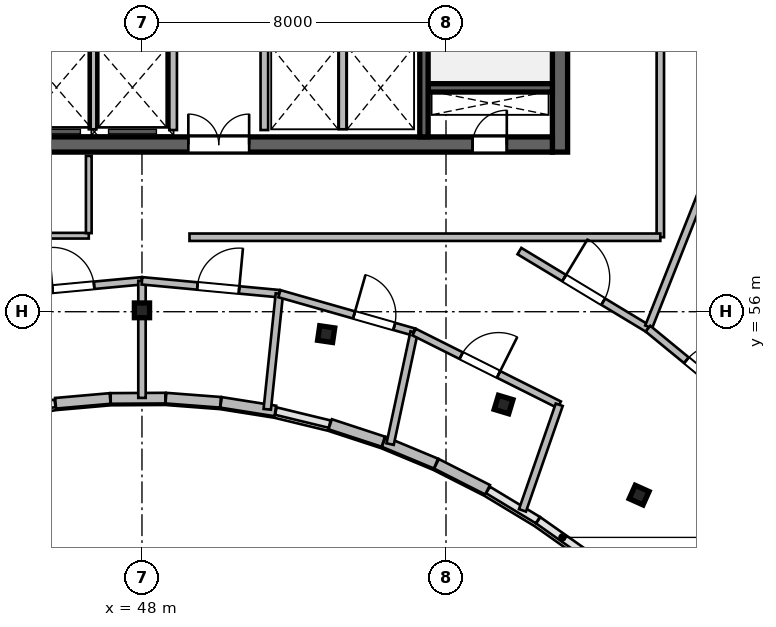
"""IFC4 building model, lengths in metres.
Left out: names, types, materials, properties, quantities, classifications, styles, units other than length and angle.
Written with IfcOpenShell. Run it as: python <this file> out.ifc"""

import sys

from ifc_helpers import new_model, si_unit, direction, frame, frame_2d, origin, origin_2d, place, context, subcontext, project, spatial, rectangle, i_section, extrude, source, transform, mapped, element, fill, save


model = new_model("IFC4")
c1 = context("Model", 3, precision=1e-05, world=origin(), true_north=direction((0.0, 1.0)))
c2 = subcontext(c1, "Body", "Model", "MODEL_VIEW")
j1 = project(units=[si_unit("LENGTHUNIT", "METRE"), si_unit("PLANEANGLEUNIT", "RADIAN")], contexts=[c1])
p1 = place(None, origin())
s1 = spatial("IfcSite", under=j1, at=p1, CompositionType="ELEMENT")
p2 = place(p1, origin())
s2 = spatial("IfcBuilding", under=s1, at=p2, CompositionType="ELEMENT")
p3 = place(p2, frame((0.0, 0.0, 283.5)))
s3 = spatial("IfcBuildingStorey", under=s2, at=p3, CompositionType="ELEMENT", Elevation=283.5)
m1 = source(origin(), c2, "Body", "SweptSolid", [
    extrude(rectangle(XDim=12.0, YDim=0.4, at=frame_2d((6.0, 0.0))), origin(), (0.0, 0.0, 1.0), 3.9),
])
p4 = place(p3, frame((59.0, 60.2, 0.0), z_axis=(0.0, 0.0, 1.0), x_axis=(0.0, 1.0, 0.0)))
e1 = element("IfcWall", 1, at=p4, inside=s3, PredefinedType="SHEAR", context=c2, shape_type="MappedRepresentation", body=[
    mapped(m1, transform((0.0, 0.0, 0.0), scale=1.0)),
])
m2 = source(origin(), c2, "Body", "SweptSolid", [
    extrude(rectangle(XDim=21.6, YDim=0.4, at=frame_2d((10.8, 0.0))), origin(), (0.0, 0.0, 1.0), 3.9),
])
p5 = place(p3, frame((37.2, 60.4, 0.0), z_axis=(0.0, 0.0, 1.0), x_axis=(1.0, 0.0, 0.0)))
e2 = element("IfcWall", 2, at=p5, inside=s3, PredefinedType="SHEAR", context=c2, shape_type="MappedRepresentation", body=[
    mapped(m2, transform((0.0, 0.0, 0.0), scale=1.0)),
])
p6 = place(p5, frame((1.1, 0.0, 0.0)))
e3 = element("IfcOpeningElement", 3, at=p6, cuts=e2, PredefinedType="OPENING", context=c2, shape_type="SweptSolid", body=[
    extrude(rectangle(XDim=1.15, YDim=2.15, at=frame_2d((0.575, 1.075))), frame((0.0, 0.21, 0.0), z_axis=(0.0, -1.0, 0.0), x_axis=(1.0, 0.0, 0.0)), (0.0, 0.0, 1.0), 0.42),
])
p7 = place(p5, frame((19.5, 0.0, 0.0)))
e4 = element("IfcOpeningElement", 4, at=p7, cuts=e2, PredefinedType="OPENING", context=c2, shape_type="SweptSolid", body=[
    extrude(rectangle(XDim=0.9, YDim=2.1, at=frame_2d((0.45, 1.05))), frame((0.0, 0.21, 0.0), z_axis=(0.0, -1.0, 0.0), x_axis=(1.0, 0.0, 0.0)), (0.0, 0.0, 1.0), 0.42),
])
p8 = place(p5, frame((12.02, 0.0, 0.0)))
e5 = element("IfcOpeningElement", 5, at=p8, cuts=e2, PredefinedType="OPENING", context=c2, shape_type="SweptSolid", body=[
    extrude(rectangle(XDim=1.6, YDim=2.15, at=frame_2d((0.8, 1.075))), frame((0.0, 0.21, 0.0), z_axis=(0.0, -1.0, 0.0), x_axis=(1.0, 0.0, 0.0)), (0.0, 0.0, 1.0), 0.42),
])
m3 = source(origin(), c2, "Body", "SweptSolid", [
    extrude(rectangle(XDim=3.27, YDim=0.22, at=frame_2d((1.635, 0.0))), origin(), (0.0, 0.0, 1.0), 3.9),
])
p9 = place(p3, frame((55.53, 61.89, 0.0), z_axis=(0.0, 0.0, 1.0), x_axis=(1.0, 0.0, 0.0)))
e6 = element("IfcWall", 6, at=p9, inside=s3, PredefinedType="SHEAR", context=c2, shape_type="MappedRepresentation", body=[
    mapped(m3, transform((0.0, 0.0, 0.0), scale=1.0)),
])
m4 = source(origin(), c2, "Body", "SweptSolid", [
    extrude(rectangle(XDim=11.2, YDim=0.22, at=frame_2d((5.6, 0.0))), origin(), (0.0, 0.0, 1.0), 3.9),
])
p10 = place(p3, frame((55.42, 60.6, 0.0), z_axis=(0.0, 0.0, 1.0), x_axis=(0.0, 1.0, 0.0)))
e7 = element("IfcWall", 7, at=p10, inside=s3, PredefinedType="SHEAR", context=c2, shape_type="MappedRepresentation", body=[
    mapped(m4, transform((0.0, 0.0, 0.0), scale=1.0)),
])
p11 = place(p10, frame((9.645, 0.0, 0.0)))
e8 = element("IfcOpeningElement", 8, at=p11, cuts=e7, PredefinedType="OPENING", context=c2, shape_type="SweptSolid", body=[
    extrude(rectangle(XDim=1.15, YDim=2.15, at=frame_2d((0.575, 1.075))), frame((0.0, 0.12, 0.0), z_axis=(0.0, -1.0, 0.0), x_axis=(1.0, 0.0, 0.0)), (0.0, 0.0, 1.0), 0.24),
])
m5 = source(origin(), c2, "Body", "SweptSolid", [
    extrude(i_section(OverallWidth=0.399, OverallDepth=0.387, WebThickness=0.021, FlangeThickness=0.033, at=origin_2d()), origin(), (0.0, 0.0, 1.0), 3.9),
])
for number, where, z_axis, x_axis in (
    (9, (48.0, 56.036, 0.0), (0.0, 0.0, 1.0), (0.0, 1.0, 0.0)),
    (10, (52.846, 55.411, 0.0), (0.0, 0.0, 1.0), (0.143, 0.99, 0.0)),
    (11, (57.515, 53.558, 0.0), (0.0, 0.0, 1.0), (0.289, 0.957, 0.0)),
    (12, (61.082, 51.175, 0.0), (0.0, 0.0, 1.0), (0.409, 0.912, 0.0)),
):
    element("IfcColumn", number, at=place(p3, frame(where, z_axis=z_axis, x_axis=x_axis)), inside=s3, PredefinedType="COLUMN", context=c2, shape_type="MappedRepresentation", body=[
        mapped(m5, transform((0.0, 0.0, 0.0), scale=1.0)),
    ])
m6 = source(origin(), c2, "Body", "SweptSolid", [
    extrude(rectangle(XDim=1.509, YDim=0.28, at=frame_2d((0.754, 0.0))), origin(), (0.0, 0.0, 1.0), 3.64),
])
p12 = place(p3, frame((57.094, 51.315, 0.0), z_axis=(0.0, 0.0, 1.0), x_axis=(-0.89169189228, 0.452642871635, 0.0)))
e13 = element("IfcWall", 13, at=p12, inside=s3, PredefinedType="SOLIDWALL", context=c2, shape_type="MappedRepresentation", body=[
    mapped(m6, transform((0.0, 0.0, 0.0), scale=1.0)),
])
m7 = source(origin(), c2, "Body", "SweptSolid", [
    extrude(rectangle(XDim=1.488, YDim=0.28, at=frame_2d((0.744, 0.0))), origin(), (0.0, 0.0, 1.0), 3.64),
])
p13 = place(p3, frame((55.736, 52.004, 0.0), z_axis=(0.0, 0.0, 1.0), x_axis=(-0.923261314935, 0.384172545017, 0.0)))
e14 = element("IfcWall", 14, at=p13, inside=s3, PredefinedType="SOLIDWALL", context=c2, shape_type="MappedRepresentation", body=[
    mapped(m7, transform((0.0, 0.0, 0.0), scale=1.0)),
])
m8 = source(origin(), c2, "Body", "SweptSolid", [
    extrude(rectangle(XDim=1.47, YDim=0.28, at=frame_2d((0.735, 0.0))), origin(), (0.0, 0.0, 1.0), 3.64),
])
p14 = place(p3, frame((54.35, 52.58, 0.0), z_axis=(0.0, 0.0, 1.0), x_axis=(-0.950248878954, 0.311491682145, 0.0)))
e15 = element("IfcWall", 15, at=p14, inside=s3, PredefinedType="SOLIDWALL", context=c2, shape_type="MappedRepresentation", body=[
    mapped(m8, transform((0.0, 0.0, 0.0), scale=1.0)),
])
m9 = source(origin(), c2, "Body", "SweptSolid", [
    extrude(rectangle(XDim=1.446, YDim=0.28, at=frame_2d((0.723, 0.0))), origin(), (0.0, 0.0, 1.0), 3.64),
])
p15 = place(p3, frame((51.509, 53.388, 0.0), z_axis=(0.0, 0.0, 1.0), x_axis=(-0.987650460941, 0.156673440642, 0.0)))
e16 = element("IfcWall", 16, at=p15, inside=s3, PredefinedType="SOLIDWALL", context=c2, shape_type="MappedRepresentation", body=[
    mapped(m9, transform((0.0, 0.0, 0.0), scale=1.0)),
])
m10 = source(origin(), c2, "Body", "SweptSolid", [
    extrude(rectangle(XDim=1.44, YDim=0.28, at=frame_2d((0.72, 0.0))), origin(), (0.0, 0.0, 1.0), 3.64),
])
p16 = place(p3, frame((50.066, 53.616, 0.0), z_axis=(0.0, 0.0, 1.0), x_axis=(-0.997124860794, 0.075776064736, 0.0)))
e17 = element("IfcWall", 17, at=p16, inside=s3, PredefinedType="SOLIDWALL", context=c2, shape_type="MappedRepresentation", body=[
    mapped(m10, transform((0.0, 0.0, 0.0), scale=1.0)),
])
m11 = source(origin(), c2, "Body", "SweptSolid", [
    extrude(rectangle(XDim=1.438, YDim=0.28, at=frame_2d((0.719, 0.0))), origin(), (0.0, 0.0, 1.0), 3.64),
])
p17 = place(p3, frame((48.615, 53.726, 0.0), z_axis=(0.0, 0.0, 1.0), x_axis=(-0.999982357135, -0.005940153174, 0.0)))
e18 = element("IfcWall", 18, at=p17, inside=s3, PredefinedType="SOLIDWALL", context=c2, shape_type="MappedRepresentation", body=[
    mapped(m11, transform((0.0, 0.0, 0.0), scale=1.0)),
])
m12 = source(origin(), c2, "Body", "SweptSolid", [
    extrude(rectangle(XDim=1.441, YDim=0.28, at=frame_2d((0.72, 0.0))), origin(), (0.0, 0.0, 1.0), 3.64),
])
p18 = place(p3, frame((47.162, 53.717, 0.0), z_axis=(0.0, 0.0, 1.0), x_axis=(-0.99617032352, -0.087433898101, 0.0)))
e19 = element("IfcWall", 19, at=p18, inside=s3, PredefinedType="SOLIDWALL", context=c2, shape_type="MappedRepresentation", body=[
    mapped(m12, transform((0.0, 0.0, 0.0), scale=1.0)),
])
m13 = source(origin(), c2, "Body", "SweptSolid", [
    extrude(rectangle(XDim=2.24, YDim=0.2, at=frame_2d((1.12, 0.0))), origin(), (0.0, 0.0, 1.0), 3.64),
])
for number, where, z_axis, x_axis in (
    (20, (48.82, 60.78, 0.0), (0.0, 0.0, 1.0), (0.0, 1.0, 0.0)),
    (21, (51.22, 60.78, 0.0), (0.0, 0.0, 1.0), (0.0, 1.0, 0.0)),
):
    element("IfcWall", number, at=place(p3, frame(where, z_axis=z_axis, x_axis=x_axis)), inside=s3, PredefinedType="SOLIDWALL", context=c2, shape_type="MappedRepresentation", body=[
        mapped(m13, transform((0.0, 0.0, 0.0), scale=1.0)),
    ])
m14 = source(origin(), c2, "Body", "SweptSolid", [
    extrude(rectangle(XDim=2.2, YDim=0.2, at=frame_2d((1.1, 0.0))), origin(), (0.0, 0.0, 1.0), 3.64),
])
for number, where, z_axis, x_axis in (
    (22, (46.7, 60.8, 0.0), (0.0, 0.0, 1.0), (0.0, 1.0, 0.0)),
    (23, (53.28, 60.8, 0.0), (0.0, 0.0, 1.0), (0.0, 1.0, 0.0)),
):
    element("IfcWall", number, at=place(p3, frame(where, z_axis=z_axis, x_axis=x_axis)), inside=s3, PredefinedType="SOLIDWALL", context=c2, shape_type="MappedRepresentation", body=[
        mapped(m14, transform((0.0, 0.0, 0.0), scale=1.0)),
    ])
m15 = source(origin(), c2, "Body", "SweptSolid", [
    extrude(rectangle(XDim=5.4, YDim=0.15, at=frame_2d((2.7, 0.0))), origin(), (0.0, 0.0, 1.0), 3.64),
])
p19 = place(p3, frame((41.2, 58.0, 0.0), z_axis=(0.0, 0.0, 1.0), x_axis=(1.0, 0.0, 0.0)))
e24 = element("IfcWall", 24, at=p19, inside=s3, PredefinedType="PARTITIONING", context=c2, shape_type="MappedRepresentation", body=[
    mapped(m15, transform((0.0, 0.0, 0.0), scale=1.0)),
])
m16 = source(origin(), c2, "Body", "SweptSolid", [
    extrude(rectangle(XDim=2.033, YDim=0.15, at=frame_2d((1.016, 0.0))), origin(), (0.0, 0.0, 1.0), 3.64),
])
p20 = place(p3, frame((46.6, 58.067, 0.0), z_axis=(0.0, 0.0, 1.0), x_axis=(0.0, 1.0, 0.0)))
e25 = element("IfcWall", 25, at=p20, inside=s3, PredefinedType="PARTITIONING", context=c2, shape_type="MappedRepresentation", body=[
    mapped(m16, transform((0.0, 0.0, 0.0), scale=1.0)),
])
m17 = source(origin(), c2, "Body", "SweptSolid", [
    extrude(rectangle(XDim=3.632, YDim=0.195, at=frame_2d((1.816, 0.0))), origin(), (0.0, 0.0, 1.0), 3.64),
])
p21 = place(p3, frame((44.384, 56.474, 0.0), z_axis=(0.0, 0.0, 1.0), x_axis=(0.99563695898, 0.093311552942, 0.0)))
e26 = element("IfcWall", 26, at=p21, inside=s3, PredefinedType="PARTITIONING", context=c2, shape_type="MappedRepresentation", body=[
    mapped(m17, transform((0.0, 0.0, 0.0), scale=1.0)),
])
p22 = place(p21, frame((1.266, 0.0, 0.0)))
e27 = element("IfcOpeningElement", 27, at=p22, cuts=e26, PredefinedType="OPENING", context=c2, shape_type="SweptSolid", body=[
    extrude(rectangle(XDim=1.1, YDim=2.15, at=frame_2d((0.55, 1.075))), frame((0.0, 0.107, 0.0), z_axis=(0.0, -1.0, 0.0), x_axis=(1.0, 0.0, 0.0)), (0.0, 0.0, 1.0), 0.215),
])
m18 = source(origin(), c2, "Body", "SweptSolid", [
    extrude(rectangle(XDim=3.081, YDim=0.195, at=frame_2d((1.54, 0.0))), origin(), (0.0, 0.0, 1.0), 3.314),
])
p23 = place(p3, frame((48.0, 53.733, 0.0), z_axis=(0.0, 0.0, 1.0), x_axis=(0.0, 1.0, 0.0)))
e28 = element("IfcWall", 28, at=p23, inside=s3, PredefinedType="PARTITIONING", context=c2, shape_type="MappedRepresentation", body=[
    mapped(m18, transform((0.0, 0.0, 0.0), scale=1.0)),
])
p24 = place(p3, frame((48.0, 56.813, 0.0), z_axis=(0.0, 0.0, 1.0), x_axis=(0.99563695898, -0.093311552942, 0.0)))
e29 = element("IfcWall", 29, at=p24, inside=s3, PredefinedType="PARTITIONING", context=c2, shape_type="MappedRepresentation", body=[
    mapped(m17, transform((0.0, 0.0, 0.0), scale=1.0)),
])
p25 = place(p24, frame((1.466, 0.0, 0.0)))
e30 = element("IfcOpeningElement", 30, at=p25, cuts=e29, PredefinedType="OPENING", context=c2, shape_type="SweptSolid", body=[
    extrude(rectangle(XDim=1.1, YDim=2.15, at=frame_2d((0.55, 1.075))), frame((0.0, 0.107, 0.0), z_axis=(0.0, -1.0, 0.0), x_axis=(1.0, 0.0, 0.0)), (0.0, 0.0, 1.0), 0.215),
])
m19 = source(origin(), c2, "Body", "SweptSolid", [
    extrude(rectangle(XDim=3.059, YDim=0.195, at=frame_2d((1.53, 0.0))), origin(), (0.0, 0.0, 1.0), 3.64),
])
p26 = place(p3, frame((51.297, 53.432, 0.0), z_axis=(0.0, 0.0, 1.0), x_axis=(0.10430673596, 0.994545174858, 0.0)))
e31 = element("IfcWall", 31, at=p26, inside=s3, PredefinedType="PARTITIONING", context=c2, shape_type="MappedRepresentation", body=[
    mapped(m19, transform((0.0, 0.0, 0.0), scale=1.0)),
])
m20 = source(origin(), c2, "Body", "SweptSolid", [
    extrude(rectangle(XDim=3.687, YDim=0.195, at=frame_2d((1.843, 0.0))), origin(), (0.0, 0.0, 1.0), 3.64),
])
p27 = place(p3, frame((51.616, 56.474, 0.0), z_axis=(0.0, 0.0, 1.0), x_axis=(0.961753532248, -0.27391630694, 0.0)))
e32 = element("IfcWall", 32, at=p27, inside=s3, PredefinedType="PARTITIONING", context=c2, shape_type="MappedRepresentation", body=[
    mapped(m20, transform((0.0, 0.0, 0.0), scale=1.0)),
])
p28 = place(p27, frame((2.043, 0.0, 0.0)))
e33 = element("IfcOpeningElement", 33, at=p28, cuts=e32, PredefinedType="OPENING", context=c2, shape_type="SweptSolid", body=[
    extrude(rectangle(XDim=1.1, YDim=2.15, at=frame_2d((0.55, 1.075))), frame((0.0, 0.107, 0.0), z_axis=(0.0, -1.0, 0.0), x_axis=(1.0, 0.0, 0.0)), (0.0, 0.0, 1.0), 0.215),
])
m21 = source(origin(), c2, "Body", "SweptSolid", [
    extrude(rectangle(XDim=3.015, YDim=0.195, at=frame_2d((1.507, 0.0))), origin(), (0.0, 0.0, 1.0), 3.64),
])
p29 = place(p3, frame((54.53, 52.517, 0.0), z_axis=(0.0, 0.0, 1.0), x_axis=(0.209258086484, 0.977860446711, 0.0)))
e34 = element("IfcWall", 34, at=p29, inside=s3, PredefinedType="PARTITIONING", context=c2, shape_type="MappedRepresentation", body=[
    mapped(m21, transform((0.0, 0.0, 0.0), scale=1.0)),
])
m22 = source(origin(), c2, "Body", "SweptSolid", [
    extrude(rectangle(XDim=4.271, YDim=0.195, at=frame_2d((2.135, 0.0))), origin(), (0.0, 0.0, 1.0), 3.64),
])
p30 = place(p3, frame((55.161, 55.465, 0.0), z_axis=(0.0, 0.0, 1.0), x_axis=(0.894061035522, -0.447945158207, 0.0)))
e35 = element("IfcWall", 35, at=p30, inside=s3, PredefinedType="PARTITIONING", context=c2, shape_type="MappedRepresentation", body=[
    mapped(m22, transform((0.0, 0.0, 0.0), scale=1.0)),
])
p31 = place(p30, frame((1.385, 0.0, 0.0)))
e36 = element("IfcOpeningElement", 36, at=p31, cuts=e35, PredefinedType="OPENING", context=c2, shape_type="SweptSolid", body=[
    extrude(rectangle(XDim=1.1, YDim=2.15, at=frame_2d((0.55, 1.075))), frame((0.0, 0.107, 0.0), z_axis=(0.0, -1.0, 0.0), x_axis=(1.0, 0.0, 0.0)), (0.0, 0.0, 1.0), 0.215),
])
m23 = source(origin(), c2, "Body", "SweptSolid", [
    extrude(rectangle(XDim=2.942, YDim=0.195, at=frame_2d((1.471, 0.0))), origin(), (0.0, 0.0, 1.0), 3.64),
])
p32 = place(p3, frame((58.013, 50.773, 0.0), z_axis=(0.0, 0.0, 1.0), x_axis=(0.328623620494, 0.944460965871, 0.0)))
e37 = element("IfcWall", 37, at=p32, inside=s3, PredefinedType="PARTITIONING", context=c2, shape_type="MappedRepresentation", body=[
    mapped(m23, transform((0.0, 0.0, 0.0), scale=1.0)),
])
m24 = source(origin(), c2, "Body", "SweptSolid", [
    extrude(rectangle(XDim=3.951, YDim=0.195, at=frame_2d((1.975, 0.0))), origin(), (0.0, 0.0, 1.0), 3.64),
])
p33 = place(p3, frame((57.932, 57.596, 0.0), z_axis=(0.0, 0.0, 1.0), x_axis=(0.856137696849, -0.51674775668, 0.0)))
e38 = element("IfcWall", 38, at=p33, inside=s3, PredefinedType="PARTITIONING", context=c2, shape_type="MappedRepresentation", body=[
    mapped(m24, transform((0.0, 0.0, 0.0), scale=1.0)),
])
p34 = place(p33, frame((1.375, 0.0, 0.0)))
e39 = element("IfcOpeningElement", 39, at=p34, cuts=e38, PredefinedType="OPENING", context=c2, shape_type="SweptSolid", body=[
    extrude(rectangle(XDim=1.2, YDim=2.15, at=frame_2d((0.6, 1.075))), frame((0.0, 0.107, 0.0), z_axis=(0.0, -1.0, 0.0), x_axis=(1.0, 0.0, 0.0)), (0.0, 0.0, 1.0), 0.215),
])
m25 = source(origin(), c2, "Body", "SweptSolid", [
    extrude(rectangle(XDim=17.664, YDim=0.195, at=frame_2d((8.832, 0.0))), origin(), (0.0, 0.0, 1.0), 3.64),
])
p35 = place(p3, frame((61.333, 55.602, 0.0), z_axis=(0.0, 0.0, 1.0), x_axis=(0.368827513738, 0.929497856431, 0.0)))
e40 = element("IfcWall", 40, at=p35, inside=s3, PredefinedType="PARTITIONING", context=c2, shape_type="MappedRepresentation", body=[
    mapped(m25, transform((0.0, 0.0, 0.0), scale=1.0)),
])
m26 = source(origin(), c2, "Body", "SweptSolid", [
    extrude(rectangle(XDim=3.82, YDim=0.195, at=frame_2d((1.91, 0.0))), origin(), (0.0, 0.0, 1.0), 3.64),
])
p36 = place(p3, frame((61.314, 55.554, 0.0), z_axis=(0.0, 0.0, 1.0), x_axis=(0.772805728445, -0.63464266015, 0.0)))
e41 = element("IfcWall", 41, at=p36, inside=s3, PredefinedType="PARTITIONING", context=c2, shape_type="MappedRepresentation", body=[
    mapped(m26, transform((0.0, 0.0, 0.0), scale=1.0)),
])
p37 = place(p36, frame((1.31, 0.0, 0.0)))
e42 = element("IfcOpeningElement", 42, at=p37, cuts=e41, PredefinedType="OPENING", context=c2, shape_type="SweptSolid", body=[
    extrude(rectangle(XDim=1.2, YDim=2.15, at=frame_2d((0.6, 1.075))), frame((0.0, 0.107, 0.0), z_axis=(0.0, -1.0, 0.0), x_axis=(1.0, 0.0, 0.0)), (0.0, 0.0, 1.0), 0.215),
])
m27 = source(origin(), c2, "Body", "SweptSolid", [
    extrude(rectangle(XDim=17.693, YDim=0.195, at=frame_2d((8.847, 0.0))), origin(), (0.0, 0.0, 1.0), 3.64),
])
p38 = place(p3, frame((61.64, 57.96, 0.0), z_axis=(0.0, 0.0, 1.0), x_axis=(0.0, 1.0, 0.0)))
e43 = element("IfcWall", 43, at=p38, inside=s3, PredefinedType="PARTITIONING", context=c2, shape_type="MappedRepresentation", body=[
    mapped(m27, transform((0.0, 0.0, 0.0), scale=1.0)),
])
m28 = source(origin(), c2, "Body", "SweptSolid", [
    extrude(rectangle(XDim=12.39, YDim=0.195, at=frame_2d((6.195, 0.0))), origin(), (0.0, 0.0, 1.0), 3.64),
])
p39 = place(p3, frame((49.25, 57.96, 0.0), z_axis=(0.0, 0.0, 1.0), x_axis=(1.0, 0.0, 0.0)))
e44 = element("IfcWall", 44, at=p39, inside=s3, PredefinedType="PARTITIONING", context=c2, shape_type="MappedRepresentation", body=[
    mapped(m28, transform((0.0, 0.0, 0.0), scale=1.0)),
])
m29 = source(origin(), c2, "Body", "SweptSolid", [
    extrude(rectangle(XDim=0.9, YDim=2.1, at=frame_2d((0.45, 1.05))), frame((0.0, 0.025, 0.0), z_axis=(0.0, -1.0, 0.0), x_axis=(1.0, 0.0, 0.0)), (0.0, 0.0, 1.0), 0.05),
])
p40 = place(p7, origin())
e45 = element("IfcDoor", 45, at=p40, inside=s3, OperationType="SINGLE_SWING_RIGHT", PredefinedType="DOOR", context=c2, shape_type="MappedRepresentation", body=[
    mapped(m29, transform((0.0, 0.0, 0.0), scale=1.0)),
])
fill(e4, e45)
m30 = source(origin(), c2, "Body", "SweptSolid", [
    extrude(rectangle(XDim=1.6, YDim=2.15, at=frame_2d((0.8, 1.075))), frame((0.0, 0.025, 0.0), z_axis=(0.0, -1.0, 0.0), x_axis=(1.0, 0.0, 0.0)), (0.0, 0.0, 1.0), 0.05),
])
p41 = place(p8, origin())
e46 = element("IfcDoor", 46, at=p41, inside=s3, OperationType="DOUBLE_DOOR_SINGLE_SWING", PredefinedType="DOOR", context=c2, shape_type="MappedRepresentation", body=[
    mapped(m30, transform((0.0, 0.0, 0.0), scale=1.0)),
])
fill(e5, e46)
m31 = source(origin(), c2, "Body", "SweptSolid", [
    extrude(rectangle(XDim=1.1, YDim=2.15, at=frame_2d((0.55, 1.075))), frame((0.0, 0.025, 0.0), z_axis=(0.0, -1.0, 0.0), x_axis=(1.0, 0.0, 0.0)), (0.0, 0.0, 1.0), 0.05),
])
p42 = place(p22, origin())
e47 = element("IfcDoor", 47, at=p42, inside=s3, OperationType="SINGLE_SWING_LEFT", PredefinedType="DOOR", context=c2, shape_type="MappedRepresentation", body=[
    mapped(m31, transform((0.0, 0.0, 0.0), scale=1.0)),
])
fill(e27, e47)
p43 = place(p25, origin())
e48 = element("IfcDoor", 48, at=p43, inside=s3, OperationType="SINGLE_SWING_RIGHT", PredefinedType="DOOR", context=c2, shape_type="MappedRepresentation", body=[
    mapped(m31, transform((0.0, 0.0, 0.0), scale=1.0)),
])
fill(e30, e48)
p44 = place(p28, origin())
e49 = element("IfcDoor", 49, at=p44, inside=s3, OperationType="SINGLE_SWING_LEFT", PredefinedType="DOOR", context=c2, shape_type="MappedRepresentation", body=[
    mapped(m31, transform((0.0, 0.0, 0.0), scale=1.0)),
])
fill(e33, e49)
p45 = place(p31, origin())
e50 = element("IfcDoor", 50, at=p45, inside=s3, OperationType="SINGLE_SWING_RIGHT", PredefinedType="DOOR", context=c2, shape_type="MappedRepresentation", body=[
    mapped(m31, transform((0.0, 0.0, 0.0), scale=1.0)),
])
fill(e36, e50)
m32 = source(origin(), c2, "Body", "SweptSolid", [
    extrude(rectangle(XDim=1.2, YDim=2.15, at=frame_2d((0.6, 1.075))), frame((0.0, 0.025, 0.0), z_axis=(0.0, -1.0, 0.0), x_axis=(1.0, 0.0, 0.0)), (0.0, 0.0, 1.0), 0.05),
])
p46 = place(p34, origin())
e51 = element("IfcDoor", 51, at=p46, inside=s3, OperationType="SINGLE_SWING_LEFT", PredefinedType="DOOR", context=c2, shape_type="MappedRepresentation", body=[
    mapped(m32, transform((0.0, 0.0, 0.0), scale=1.0)),
])
fill(e39, e51)
p47 = place(p37, origin())
e52 = element("IfcDoor", 52, at=p47, inside=s3, OperationType="SINGLE_SWING_RIGHT", PredefinedType="DOOR", context=c2, shape_type="MappedRepresentation", body=[
    mapped(m32, transform((0.0, 0.0, 0.0), scale=1.0)),
])
fill(e42, e52)
save(model, sys.argv[1])
